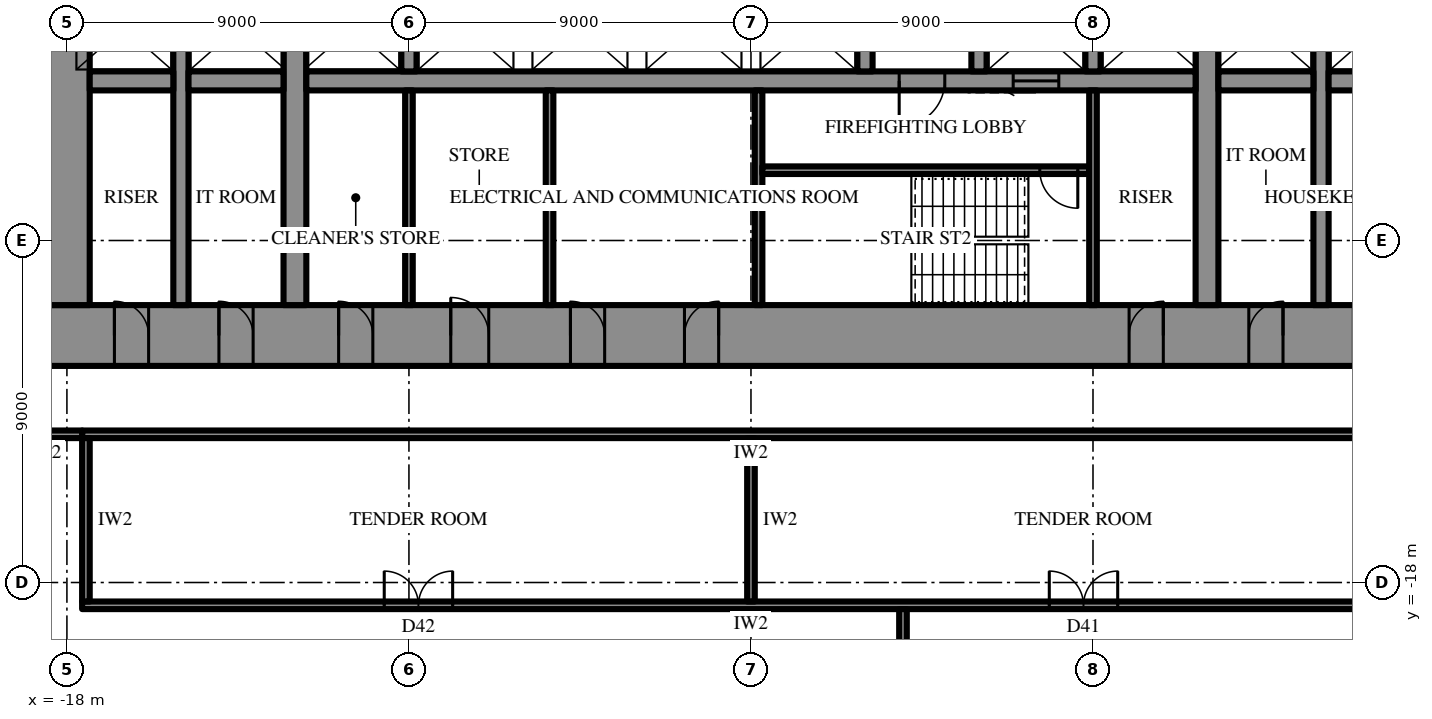
"""IFC4 building model, lengths in metres.
Left out: names, types, materials, properties, quantities, classifications, styles, units other than length and angle.
Written with IfcOpenShell. Run it as: python <this file> out.ifc"""

import sys

from ifc_helpers import new_model, si_unit, direction, frame, frame_2d, origin, place, context, subcontext, project, spatial, rectangle, extrude, element, fill, save


model = new_model("IFC4")
c1 = context("Model", 3, precision=1e-05, world=origin(), true_north=direction((0.0, 1.0)))
c2 = subcontext(c1, "Body", "Model", "MODEL_VIEW")
j1 = project(units=[si_unit("LENGTHUNIT", "METRE"), si_unit("PLANEANGLEUNIT", "RADIAN")], contexts=[c1])
p1 = place(None, origin())
s1 = spatial("IfcSite", under=j1, at=p1, CompositionType="ELEMENT")
p2 = place(p1, origin())
s2 = spatial("IfcBuilding", under=s1, at=p2, CompositionType="ELEMENT")
p3 = place(p2, frame((0.0, 0.0, 65.5)))
s3 = spatial("IfcBuildingStorey", under=s2, at=p3, CompositionType="ELEMENT", Elevation=65.5)
p4 = place(p3, frame((18.6, -11.5, 0.0), z_axis=(0.0, 0.0, 1.0), x_axis=(-1.0, 0.0, 0.0)))
e1 = element("IfcWall", 1, at=p4, inside=s3, PredefinedType="SHEAR", context=c2, shape_type="SweptSolid", body=[
    extrude(rectangle(XDim=37.2, YDim=1.6, at=frame_2d((18.6, 0.0))), origin(), (0.0, 0.0, 1.0), 4.2),
])
p5 = place(p4, frame((19.45, 0.0, 0.0)))
e2 = element("IfcOpeningElement", 2, at=p5, cuts=e1, PredefinedType="OPENING", context=c2, shape_type="SweptSolid", body=[
    extrude(rectangle(XDim=0.9, YDim=2.2, at=frame_2d((0.45, 1.1))), frame((0.0, 0.81, 0.0), z_axis=(0.0, -1.0, 0.0), x_axis=(1.0, 0.0, 0.0)), (0.0, 0.0, 1.0), 1.62),
])
p6 = place(p4, frame((22.45, 0.0, 0.0)))
e3 = element("IfcOpeningElement", 3, at=p6, cuts=e1, PredefinedType="OPENING", context=c2, shape_type="SweptSolid", body=[
    extrude(rectangle(XDim=0.9, YDim=2.2, at=frame_2d((0.45, 1.1))), frame((0.0, 0.81, 0.0), z_axis=(0.0, -1.0, 0.0), x_axis=(1.0, 0.0, 0.0)), (0.0, 0.0, 1.0), 1.62),
])
p7 = place(p4, frame((25.5, 0.0, 0.0)))
e4 = element("IfcOpeningElement", 4, at=p7, cuts=e1, PredefinedType="OPENING", context=c2, shape_type="SweptSolid", body=[
    extrude(rectangle(XDim=1.0, YDim=2.2, at=frame_2d((0.5, 1.1))), frame((0.0, 0.81, 0.0), z_axis=(0.0, -1.0, 0.0), x_axis=(1.0, 0.0, 0.0)), (0.0, 0.0, 1.0), 1.62),
])
p8 = place(p4, frame((1.85, 0.0, 0.0)))
e5 = element("IfcOpeningElement", 5, at=p8, cuts=e1, PredefinedType="OPENING", context=c2, shape_type="SweptSolid", body=[
    extrude(rectangle(XDim=0.9, YDim=2.2, at=frame_2d((0.45, 1.1))), frame((0.0, 0.81, 0.0), z_axis=(0.0, -1.0, 0.0), x_axis=(1.0, 0.0, 0.0)), (0.0, 0.0, 1.0), 1.62),
])
p9 = place(p4, frame((4.6, 0.0, 0.0)))
e6 = element("IfcOpeningElement", 6, at=p9, cuts=e1, PredefinedType="OPENING", context=c2, shape_type="SweptSolid", body=[
    extrude(rectangle(XDim=0.9, YDim=2.2, at=frame_2d((0.45, 1.1))), frame((0.0, 0.81, 0.0), z_axis=(0.0, -1.0, 0.0), x_axis=(1.0, 0.0, 0.0)), (0.0, 0.0, 1.0), 1.62),
])
p10 = place(p4, frame((7.75, 0.0, 0.0)))
e7 = element("IfcOpeningElement", 7, at=p10, cuts=e1, PredefinedType="OPENING", context=c2, shape_type="SweptSolid", body=[
    extrude(rectangle(XDim=0.9, YDim=2.2, at=frame_2d((0.45, 1.1))), frame((0.0, 0.81, 0.0), z_axis=(0.0, -1.0, 0.0), x_axis=(1.0, 0.0, 0.0)), (0.0, 0.0, 1.0), 1.62),
])
p11 = place(p4, frame((28.55, 0.0, 0.0)))
e8 = element("IfcOpeningElement", 8, at=p11, cuts=e1, PredefinedType="OPENING", context=c2, shape_type="SweptSolid", body=[
    extrude(rectangle(XDim=0.9, YDim=2.2, at=frame_2d((0.45, 1.1))), frame((0.0, 0.81, 0.0), z_axis=(0.0, -1.0, 0.0), x_axis=(1.0, 0.0, 0.0)), (0.0, 0.0, 1.0), 1.62),
])
p12 = place(p4, frame((31.7, 0.0, 0.0)))
e9 = element("IfcOpeningElement", 9, at=p12, cuts=e1, PredefinedType="OPENING", context=c2, shape_type="SweptSolid", body=[
    extrude(rectangle(XDim=0.9, YDim=2.2, at=frame_2d((0.45, 1.1))), frame((0.0, 0.81, 0.0), z_axis=(0.0, -1.0, 0.0), x_axis=(1.0, 0.0, 0.0)), (0.0, 0.0, 1.0), 1.62),
])
p13 = place(p4, frame((34.45, 0.0, 0.0)))
e10 = element("IfcOpeningElement", 10, at=p13, cuts=e1, PredefinedType="OPENING", context=c2, shape_type="SweptSolid", body=[
    extrude(rectangle(XDim=0.9, YDim=2.2, at=frame_2d((0.45, 1.1))), frame((0.0, 0.81, 0.0), z_axis=(0.0, -1.0, 0.0), x_axis=(1.0, 0.0, 0.0)), (0.0, 0.0, 1.0), 1.62),
])
p14 = place(p3, frame((-18.0, 10.7, 0.0), z_axis=(0.0, 0.0, 1.0), x_axis=(0.0, -1.0, 0.0)))
e11 = element("IfcWall", 11, at=p14, inside=s3, PredefinedType="SHEAR", context=c2, shape_type="SweptSolid", body=[
    extrude(rectangle(XDim=21.4, YDim=1.2, at=frame_2d((10.7, 0.0))), origin(), (0.0, 0.0, 1.0), 4.2),
])
p15 = place(p14, frame((9.8, 0.0, 0.0)))
e12 = element("IfcOpeningElement", 12, at=p15, cuts=e11, PredefinedType="OPENING", context=c2, shape_type="SweptSolid", body=[
    extrude(rectangle(XDim=1.8, YDim=2.4, at=frame_2d((0.9, 1.2))), frame((0.0, 0.61, 0.0), z_axis=(0.0, -1.0, 0.0), x_axis=(1.0, 0.0, 0.0)), (0.0, 0.0, 1.0), 1.22),
])
p16 = place(p3, frame((12.0, -10.7, 0.0), z_axis=(0.0, 0.0, 1.0), x_axis=(0.0, 1.0, 0.0)))
e13 = element("IfcWall", 13, at=p16, inside=s3, PredefinedType="SHEAR", context=c2, shape_type="SweptSolid", body=[
    extrude(rectangle(XDim=21.4, YDim=0.6, at=frame_2d((10.7, 0.0))), origin(), (0.0, 0.0, 1.0), 4.2),
])
p17 = place(p16, frame((9.8, 0.0, 0.0)))
e14 = element("IfcOpeningElement", 14, at=p17, cuts=e13, PredefinedType="OPENING", context=c2, shape_type="SweptSolid", body=[
    extrude(rectangle(XDim=1.8, YDim=2.4, at=frame_2d((0.9, 1.2))), frame((0.0, 0.31, 0.0), z_axis=(0.0, -1.0, 0.0), x_axis=(1.0, 0.0, 0.0)), (0.0, 0.0, 1.0), 0.62),
])
p18 = place(p3, frame((-12.0, -10.7, 0.0), z_axis=(0.0, 0.0, 1.0), x_axis=(0.0, 1.0, 0.0)))
e15 = element("IfcWall", 15, at=p18, inside=s3, PredefinedType="SHEAR", context=c2, shape_type="SweptSolid", body=[
    extrude(rectangle(XDim=21.4, YDim=0.6, at=frame_2d((10.7, 0.0))), origin(), (0.0, 0.0, 1.0), 4.2),
])
p19 = place(p18, frame((9.8, 0.0, 0.0)))
e16 = element("IfcOpeningElement", 16, at=p19, cuts=e15, PredefinedType="OPENING", context=c2, shape_type="SweptSolid", body=[
    extrude(rectangle(XDim=1.8, YDim=2.4, at=frame_2d((0.9, 1.2))), frame((0.0, 0.31, 0.0), z_axis=(0.0, -1.0, 0.0), x_axis=(1.0, 0.0, 0.0)), (0.0, 0.0, 1.0), 0.62),
])
p20 = place(p3, frame((15.0, -10.7, 0.0), z_axis=(0.0, 0.0, 1.0), x_axis=(0.0, 1.0, 0.0)))
e17 = element("IfcWall", 17, at=p20, inside=s3, PredefinedType="SHEAR", context=c2, shape_type="SweptSolid", body=[
    extrude(rectangle(XDim=21.4, YDim=0.4, at=frame_2d((10.7, 0.0))), origin(), (0.0, 0.0, 1.0), 4.2),
])
p21 = place(p20, frame((9.8, 0.0, 0.0)))
e18 = element("IfcOpeningElement", 18, at=p21, cuts=e17, PredefinedType="OPENING", context=c2, shape_type="SweptSolid", body=[
    extrude(rectangle(XDim=1.8, YDim=2.4, at=frame_2d((0.9, 1.2))), frame((0.0, 0.21, 0.0), z_axis=(0.0, -1.0, 0.0), x_axis=(1.0, 0.0, 0.0)), (0.0, 0.0, 1.0), 0.42),
])
p22 = place(p3, frame((-15.0, -10.7, 0.0), z_axis=(0.0, 0.0, 1.0), x_axis=(0.0, 1.0, 0.0)))
e19 = element("IfcWall", 19, at=p22, inside=s3, PredefinedType="SHEAR", context=c2, shape_type="SweptSolid", body=[
    extrude(rectangle(XDim=21.4, YDim=0.4, at=frame_2d((10.7, 0.0))), origin(), (0.0, 0.0, 1.0), 4.2),
])
p23 = place(p22, frame((9.8, 0.0, 0.0)))
e20 = element("IfcOpeningElement", 20, at=p23, cuts=e19, PredefinedType="OPENING", context=c2, shape_type="SweptSolid", body=[
    extrude(rectangle(XDim=1.8, YDim=2.4, at=frame_2d((0.9, 1.2))), frame((0.0, 0.21, 0.0), z_axis=(0.0, -1.0, 0.0), x_axis=(1.0, 0.0, 0.0)), (0.0, 0.0, 1.0), 0.42),
])
p24 = place(p3, frame((17.4, -4.8, 0.0), z_axis=(0.0, 0.0, 1.0), x_axis=(-1.0, 0.0, 0.0)))
e21 = element("IfcWall", 21, at=p24, inside=s3, PredefinedType="SHEAR", context=c2, shape_type="SweptSolid", body=[
    extrude(rectangle(XDim=2.2, YDim=0.5, at=frame_2d((1.1, 0.0))), origin(), (0.0, 0.0, 1.0), 4.2),
])
p25 = place(p3, frame((14.8, -4.8, 0.0), z_axis=(0.0, 0.0, 1.0), x_axis=(-1.0, 0.0, 0.0)))
e22 = element("IfcWall", 22, at=p25, inside=s3, PredefinedType="SHEAR", context=c2, shape_type="SweptSolid", body=[
    extrude(rectangle(XDim=2.5, YDim=0.5, at=frame_2d((1.25, 0.0))), origin(), (0.0, 0.0, 1.0), 4.2),
])
p26 = place(p3, frame((11.7, -4.8, 0.0), z_axis=(0.0, 0.0, 1.0), x_axis=(-1.0, 0.0, 0.0)))
e23 = element("IfcWall", 23, at=p26, inside=s3, PredefinedType="SHEAR", context=c2, shape_type="SweptSolid", body=[
    extrude(rectangle(XDim=23.4, YDim=0.5, at=frame_2d((11.7, 0.0))), origin(), (0.0, 0.0, 1.0), 4.2),
])
p27 = place(p26, frame((6.6, 0.0, 0.0)))
e24 = element("IfcOpeningElement", 24, at=p27, cuts=e23, PredefinedType="OPENING", context=c2, shape_type="SweptSolid", body=[
    extrude(rectangle(XDim=1.2, YDim=2.2, at=frame_2d((0.6, 1.1))), frame((0.0, 0.26, 0.0), z_axis=(0.0, -1.0, 0.0), x_axis=(1.0, 0.0, 0.0)), (0.0, 0.0, 1.0), 0.52),
])
p28 = place(p26, frame((3.6, 0.0, 0.0)))
e25 = element("IfcOpeningElement", 25, at=p28, cuts=e23, PredefinedType="OPENING", context=c2, shape_type="SweptSolid", body=[
    extrude(rectangle(XDim=1.2, YDim=2.2, at=frame_2d((0.6, 1.1))), frame((0.0, 0.26, 0.0), z_axis=(0.0, -1.0, 0.0), x_axis=(1.0, 0.0, 0.0)), (0.0, 0.0, 1.0), 0.52),
])
p29 = place(p3, frame((-12.3, -4.8, 0.0), z_axis=(0.0, 0.0, 1.0), x_axis=(-1.0, 0.0, 0.0)))
e26 = element("IfcWall", 26, at=p29, inside=s3, PredefinedType="SHEAR", context=c2, shape_type="SweptSolid", body=[
    extrude(rectangle(XDim=2.5, YDim=0.5, at=frame_2d((1.25, 0.0))), origin(), (0.0, 0.0, 1.0), 4.2),
])
p30 = place(p3, frame((-15.2, -4.8, 0.0), z_axis=(0.0, 0.0, 1.0), x_axis=(-1.0, 0.0, 0.0)))
e27 = element("IfcWall", 27, at=p30, inside=s3, PredefinedType="SHEAR", context=c2, shape_type="SweptSolid", body=[
    extrude(rectangle(XDim=2.2, YDim=0.5, at=frame_2d((1.1, 0.0))), origin(), (0.0, 0.0, 1.0), 4.2),
])
for number, where, z_axis, x_axis in (
    (28, (9.0, -2.25, 0.0), (0.0, 0.0, 1.0), (0.0, -1.0, 0.0)),
    (29, (6.0, -2.25, 0.0), (0.0, 0.0, 1.0), (0.0, -1.0, 0.0)),
    (30, (3.0, -2.25, 0.0), (0.0, 0.0, 1.0), (0.0, -1.0, 0.0)),
    (31, (-9.0, -2.25, 0.0), (0.0, 0.0, 1.0), (0.0, -1.0, 0.0)),
):
    element("IfcWall", number, at=place(p3, frame(where, z_axis=z_axis, x_axis=x_axis)), inside=s3, PredefinedType="SHEAR", context=c2, shape_type="SweptSolid", body=[
        extrude(rectangle(XDim=2.3, YDim=0.4, at=frame_2d((1.15, 0.0))), origin(), (0.0, 0.0, 1.0), 4.2),
    ])
p31 = place(p3, frame((0.2, -5.05, 0.0), z_axis=(0.0, 0.0, 1.0), x_axis=(0.0, -1.0, 0.0)))
e32 = element("IfcWall", 32, at=p31, inside=s3, PredefinedType="SHEAR", context=c2, shape_type="SweptSolid", body=[
    extrude(rectangle(XDim=5.65, YDim=0.2, at=frame_2d((2.825, 0.0))), origin(), (0.0, 0.0, 1.0), 4.2),
])
p32 = place(p3, frame((8.9, -7.15, 0.0), z_axis=(0.0, 0.0, 1.0), x_axis=(-1.0, 0.0, 0.0)))
e33 = element("IfcWall", 33, at=p32, inside=s3, PredefinedType="SHEAR", context=c2, shape_type="SweptSolid", body=[
    extrude(rectangle(XDim=8.6, YDim=0.2, at=frame_2d((4.3, 0.0))), origin(), (0.0, 0.0, 1.0), 4.2),
])
p33 = place(p32, frame((0.3, 0.0, 0.0)))
e34 = element("IfcOpeningElement", 34, at=p33, cuts=e33, PredefinedType="OPENING", context=c2, shape_type="SweptSolid", body=[
    extrude(rectangle(XDim=1.0, YDim=2.2, at=frame_2d((0.5, 1.1))), frame((0.0, 0.11, 0.0), z_axis=(0.0, -1.0, 0.0), x_axis=(1.0, 0.0, 0.0)), (0.0, 0.0, 1.0), 0.22),
])
for number, where, z_axis, x_axis in (
    (35, (9.0, -5.05, 0.0), (0.0, 0.0, 1.0), (0.0, -1.0, 0.0)),
    (36, (-9.0, -5.05, 0.0), (0.0, 0.0, 1.0), (0.0, -1.0, 0.0)),
    (37, (-5.3, -5.05, 0.0), (0.0, 0.0, 1.0), (0.0, -1.0, 0.0)),
):
    element("IfcWall", number, at=place(p3, frame(where, z_axis=z_axis, x_axis=x_axis)), inside=s3, PredefinedType="PARTITIONING", context=c2, shape_type="SweptSolid", body=[
        extrude(rectangle(XDim=5.65, YDim=0.2, at=frame_2d((2.825, 0.0))), origin(), (0.0, 0.0, 1.0), 4.0),
    ])
p34 = place(p3, frame((17.6, -14.1, 0.0), z_axis=(0.0, 0.0, 1.0), x_axis=(-1.0, 0.0, 0.0)))
e38 = element("IfcWall", 38, at=p34, inside=s3, PredefinedType="PARTITIONING", context=c2, shape_type="SweptSolid", body=[
    extrude(rectangle(XDim=35.2, YDim=0.2, at=frame_2d((17.6, 0.0))), origin(), (0.0, 0.0, 1.0), 4.0),
])
p35 = place(p3, frame((17.6, -18.6, 0.0), z_axis=(0.0, 0.0, 1.0), x_axis=(-1.0, 0.0, 0.0)))
e39 = element("IfcWall", 39, at=p35, inside=s3, PredefinedType="PARTITIONING", context=c2, shape_type="SweptSolid", body=[
    extrude(rectangle(XDim=35.2, YDim=0.2, at=frame_2d((17.6, 0.0))), origin(), (0.0, 0.0, 1.0), 4.0),
])
p36 = place(p35, frame((7.95, 0.0, 0.0)))
e40 = element("IfcOpeningElement", 40, at=p36, cuts=e39, PredefinedType="OPENING", context=c2, shape_type="SweptSolid", body=[
    extrude(rectangle(XDim=1.8, YDim=2.4, at=frame_2d((0.9, 1.2))), frame((0.0, 0.11, 0.0), z_axis=(0.0, -1.0, 0.0), x_axis=(1.0, 0.0, 0.0)), (0.0, 0.0, 1.0), 0.22),
])
p37 = place(p35, frame((25.45, 0.0, 0.0)))
e41 = element("IfcOpeningElement", 41, at=p37, cuts=e39, PredefinedType="OPENING", context=c2, shape_type="SweptSolid", body=[
    extrude(rectangle(XDim=1.8, YDim=2.4, at=frame_2d((0.9, 1.2))), frame((0.0, 0.11, 0.0), z_axis=(0.0, -1.0, 0.0), x_axis=(1.0, 0.0, 0.0)), (0.0, 0.0, 1.0), 0.22),
])
p38 = place(p3, frame((0.0, -14.2, 0.0), z_axis=(0.0, 0.0, 1.0), x_axis=(0.0, -1.0, 0.0)))
e42 = element("IfcWall", 42, at=p38, inside=s3, PredefinedType="PARTITIONING", context=c2, shape_type="SweptSolid", body=[
    extrude(rectangle(XDim=4.3, YDim=0.2, at=frame_2d((2.15, 0.0))), origin(), (0.0, 0.0, 1.0), 2.944),
])
p39 = place(p3, frame((-17.5, -14.2, 0.0), z_axis=(0.0, 0.0, 1.0), x_axis=(0.0, -1.0, 0.0)))
e43 = element("IfcWall", 43, at=p39, inside=s3, PredefinedType="PARTITIONING", context=c2, shape_type="SweptSolid", body=[
    extrude(rectangle(XDim=4.3, YDim=0.2, at=frame_2d((2.15, 0.0))), origin(), (0.0, 0.0, 1.0), 4.0),
])
p40 = place(p3, frame((-17.6, -14.1, 0.0), z_axis=(0.0, 0.0, 1.0), x_axis=(-1.0, 0.0, 0.0)))
e44 = element("IfcWall", 44, at=p40, inside=s3, PredefinedType="PARTITIONING", context=c2, shape_type="SweptSolid", body=[
    extrude(rectangle(XDim=2.0, YDim=0.2, at=frame_2d((1.0, 0.0))), origin(), (0.0, 0.0, 1.0), 4.0),
])
p41 = place(p3, frame((4.0, -18.7, 0.0), z_axis=(0.0, 0.0, 1.0), x_axis=(0.0, -1.0, 0.0)))
e45 = element("IfcWall", 45, at=p41, inside=s3, PredefinedType="PARTITIONING", context=c2, shape_type="SweptSolid", body=[
    extrude(rectangle(XDim=15.1, YDim=0.2, at=frame_2d((7.55, 0.0))), origin(), (0.0, 0.0, 1.0), 4.0),
])
p42 = place(p41, frame((1.01, 0.0, 0.0)))
e46 = element("IfcOpeningElement", 46, at=p42, cuts=e45, PredefinedType="OPENING", context=c2, shape_type="SweptSolid", body=[
    extrude(rectangle(XDim=1.0, YDim=2.2, at=frame_2d((0.5, 1.1))), frame((0.0, 0.11, 0.0), z_axis=(0.0, -1.0, 0.0), x_axis=(1.0, 0.0, 0.0)), (0.0, 0.0, 1.0), 0.22),
])
p43 = place(p27, origin())
e47 = element("IfcDoor", 47, at=p43, inside=s3, OperationType="SINGLE_SWING_LEFT", PredefinedType="DOOR", context=c2, shape_type="SweptSolid", body=[
    extrude(rectangle(XDim=1.2, YDim=2.2, at=frame_2d((0.6, 1.1))), frame((0.0, 0.025, 0.0), z_axis=(0.0, -1.0, 0.0), x_axis=(1.0, 0.0, 0.0)), (0.0, 0.0, 1.0), 0.05),
])
fill(e24, e47)
p44 = place(p33, origin())
e48 = element("IfcDoor", 48, at=p44, inside=s3, OperationType="SINGLE_SWING_RIGHT", PredefinedType="DOOR", context=c2, shape_type="SweptSolid", body=[
    extrude(rectangle(XDim=1.0, YDim=2.2, at=frame_2d((0.5, 1.1))), frame((0.0, 0.025, 0.0), z_axis=(0.0, -1.0, 0.0), x_axis=(1.0, 0.0, 0.0)), (0.0, 0.0, 1.0), 0.05),
])
fill(e34, e48)
p45 = place(p5, frame((0.9, 0.0, 0.0), z_axis=(0.0, 0.0, 1.0), x_axis=(-1.0, 0.0, 0.0)))
e49 = element("IfcDoor", 49, at=p45, inside=s3, OperationType="SINGLE_SWING_LEFT", PredefinedType="DOOR", context=c2, shape_type="SweptSolid", body=[
    extrude(rectangle(XDim=0.9, YDim=2.2, at=frame_2d((0.45, 1.1))), frame((0.0, 0.025, 0.0), z_axis=(0.0, -1.0, 0.0), x_axis=(1.0, 0.0, 0.0)), (0.0, 0.0, 1.0), 0.05),
])
fill(e2, e49)
p46 = place(p6, frame((0.9, 0.0, 0.0), z_axis=(0.0, 0.0, 1.0), x_axis=(-1.0, 0.0, 0.0)))
e50 = element("IfcDoor", 50, at=p46, inside=s3, OperationType="SINGLE_SWING_RIGHT", PredefinedType="DOOR", context=c2, shape_type="SweptSolid", body=[
    extrude(rectangle(XDim=0.9, YDim=2.2, at=frame_2d((0.45, 1.1))), frame((0.0, 0.025, 0.0), z_axis=(0.0, -1.0, 0.0), x_axis=(1.0, 0.0, 0.0)), (0.0, 0.0, 1.0), 0.05),
])
fill(e3, e50)
p47 = place(p7, frame((1.0, 0.0, 0.0), z_axis=(0.0, 0.0, 1.0), x_axis=(-1.0, 0.0, 0.0)))
e51 = element("IfcDoor", 51, at=p47, inside=s3, OperationType="SINGLE_SWING_RIGHT", PredefinedType="DOOR", context=c2, shape_type="SweptSolid", body=[
    extrude(rectangle(XDim=1.0, YDim=2.2, at=frame_2d((0.5, 1.1))), frame((0.0, 0.025, 0.0), z_axis=(0.0, -1.0, 0.0), x_axis=(1.0, 0.0, 0.0)), (0.0, 0.0, 1.0), 0.05),
])
fill(e4, e51)
p48 = place(p9, frame((0.9, 0.0, 0.0), z_axis=(0.0, 0.0, 1.0), x_axis=(-1.0, 0.0, 0.0)))
e52 = element("IfcDoor", 52, at=p48, inside=s3, OperationType="SINGLE_SWING_LEFT", PredefinedType="DOOR", context=c2, shape_type="SweptSolid", body=[
    extrude(rectangle(XDim=0.9, YDim=2.2, at=frame_2d((0.45, 1.1))), frame((0.0, 0.025, 0.0), z_axis=(0.0, -1.0, 0.0), x_axis=(1.0, 0.0, 0.0)), (0.0, 0.0, 1.0), 0.05),
])
fill(e6, e52)
p49 = place(p10, frame((0.9, 0.0, 0.0), z_axis=(0.0, 0.0, 1.0), x_axis=(-1.0, 0.0, 0.0)))
e53 = element("IfcDoor", 53, at=p49, inside=s3, OperationType="SINGLE_SWING_LEFT", PredefinedType="DOOR", context=c2, shape_type="SweptSolid", body=[
    extrude(rectangle(XDim=0.9, YDim=2.2, at=frame_2d((0.45, 1.1))), frame((0.0, 0.025, 0.0), z_axis=(0.0, -1.0, 0.0), x_axis=(1.0, 0.0, 0.0)), (0.0, 0.0, 1.0), 0.05),
])
fill(e7, e53)
p50 = place(p11, frame((0.9, 0.0, 0.0), z_axis=(0.0, 0.0, 1.0), x_axis=(-1.0, 0.0, 0.0)))
e54 = element("IfcDoor", 54, at=p50, inside=s3, OperationType="SINGLE_SWING_RIGHT", PredefinedType="DOOR", context=c2, shape_type="SweptSolid", body=[
    extrude(rectangle(XDim=0.9, YDim=2.2, at=frame_2d((0.45, 1.1))), frame((0.0, 0.025, 0.0), z_axis=(0.0, -1.0, 0.0), x_axis=(1.0, 0.0, 0.0)), (0.0, 0.0, 1.0), 0.05),
])
fill(e8, e54)
p51 = place(p12, frame((0.9, 0.0, 0.0), z_axis=(0.0, 0.0, 1.0), x_axis=(-1.0, 0.0, 0.0)))
e55 = element("IfcDoor", 55, at=p51, inside=s3, OperationType="SINGLE_SWING_RIGHT", PredefinedType="DOOR", context=c2, shape_type="SweptSolid", body=[
    extrude(rectangle(XDim=0.9, YDim=2.2, at=frame_2d((0.45, 1.1))), frame((0.0, 0.025, 0.0), z_axis=(0.0, -1.0, 0.0), x_axis=(1.0, 0.0, 0.0)), (0.0, 0.0, 1.0), 0.05),
])
fill(e9, e55)
p52 = place(p13, frame((0.9, 0.0, 0.0), z_axis=(0.0, 0.0, 1.0), x_axis=(-1.0, 0.0, 0.0)))
e56 = element("IfcDoor", 56, at=p52, inside=s3, OperationType="SINGLE_SWING_RIGHT", PredefinedType="DOOR", context=c2, shape_type="SweptSolid", body=[
    extrude(rectangle(XDim=0.9, YDim=2.2, at=frame_2d((0.45, 1.1))), frame((0.0, 0.025, 0.0), z_axis=(0.0, -1.0, 0.0), x_axis=(1.0, 0.0, 0.0)), (0.0, 0.0, 1.0), 0.05),
])
fill(e10, e56)
p53 = place(p28, origin())
e57 = element("IfcDoor", 57, at=p53, inside=s3, OperationType="SLIDING_TO_LEFT", PredefinedType="DOOR", context=c2, shape_type="SweptSolid", body=[
    extrude(rectangle(XDim=1.2, YDim=2.2, at=frame_2d((0.6, 1.1))), frame((0.0, 0.025, 0.0), z_axis=(0.0, -1.0, 0.0), x_axis=(1.0, 0.0, 0.0)), (0.0, 0.0, 1.0), 0.05),
])
fill(e25, e57)
p54 = place(p36, frame((1.8, 0.0, 0.0), z_axis=(0.0, 0.0, 1.0), x_axis=(-1.0, 0.0, 0.0)))
e58 = element("IfcDoor", 58, at=p54, inside=s3, OperationType="DOUBLE_DOOR_SINGLE_SWING", PredefinedType="DOOR", context=c2, shape_type="SweptSolid", body=[
    extrude(rectangle(XDim=1.8, YDim=2.4, at=frame_2d((0.9, 1.2))), frame((0.0, 0.025, 0.0), z_axis=(0.0, -1.0, 0.0), x_axis=(1.0, 0.0, 0.0)), (0.0, 0.0, 1.0), 0.05),
])
fill(e40, e58)
p55 = place(p37, frame((1.8, 0.0, 0.0), z_axis=(0.0, 0.0, 1.0), x_axis=(-1.0, 0.0, 0.0)))
e59 = element("IfcDoor", 59, at=p55, inside=s3, OperationType="DOUBLE_DOOR_SINGLE_SWING", PredefinedType="DOOR", context=c2, shape_type="SweptSolid", body=[
    extrude(rectangle(XDim=1.8, YDim=2.4, at=frame_2d((0.9, 1.2))), frame((0.0, 0.025, 0.0), z_axis=(0.0, -1.0, 0.0), x_axis=(1.0, 0.0, 0.0)), (0.0, 0.0, 1.0), 0.05),
])
fill(e41, e59)
save(model, sys.argv[1])
